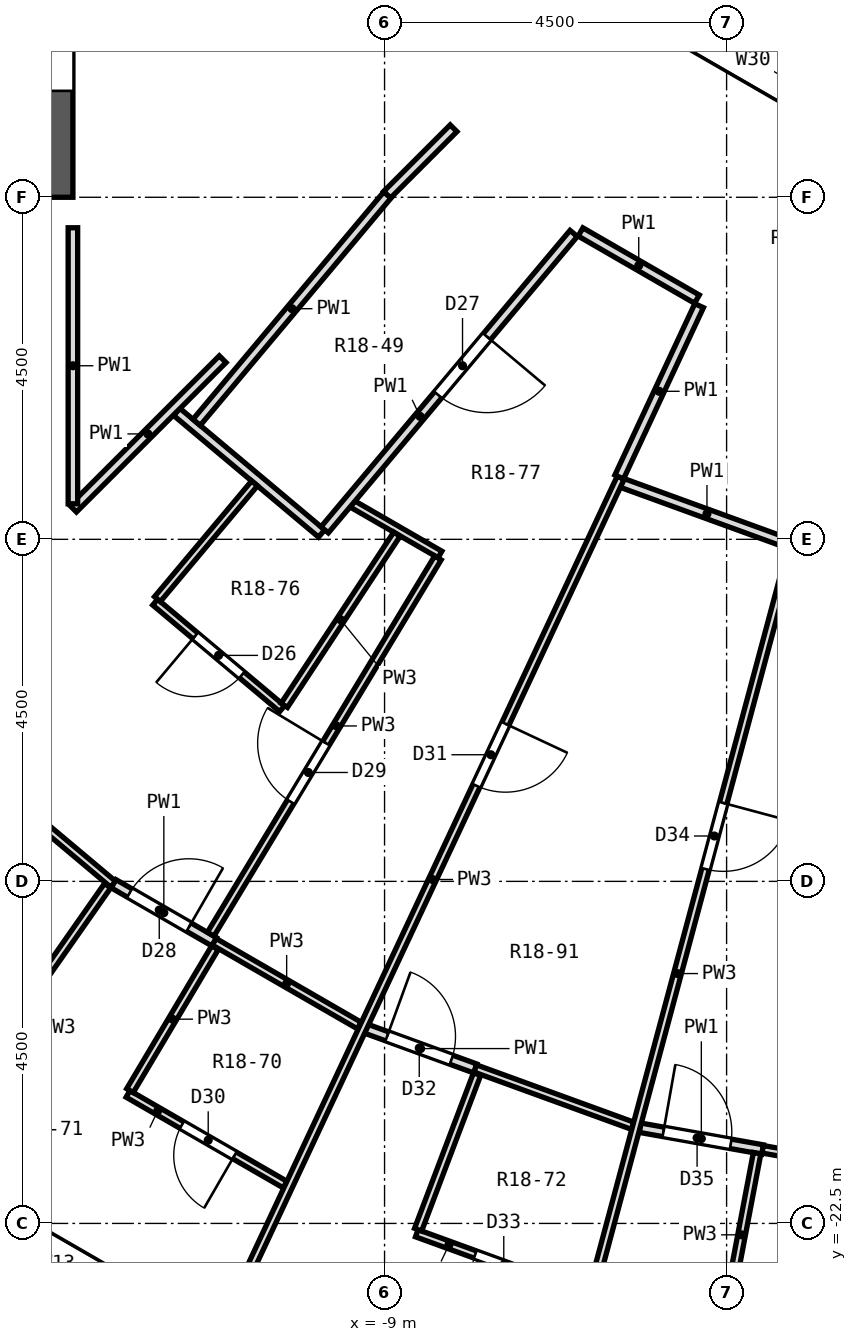
"""IFC4 building model, lengths in metres.
Left out: names, types, materials, properties, quantities, classifications, styles, units other than length and angle.
Written with IfcOpenShell. Run it as: python <this file> out.ifc"""

import sys

from ifc_helpers import new_model, si_unit, direction, frame, frame_2d, origin, place, context, subcontext, project, spatial, rectangle, extrude, element, fill, save


model = new_model("IFC4")
c1 = context("Model", 3, precision=1e-05, world=origin(), true_north=direction((0.0, 1.0)))
c2 = subcontext(c1, "Body", "Model", "MODEL_VIEW")
j1 = project(units=[si_unit("LENGTHUNIT", "METRE"), si_unit("PLANEANGLEUNIT", "RADIAN")], contexts=[c1])
p1 = place(None, origin())
s1 = spatial("IfcSite", under=j1, at=p1, CompositionType="ELEMENT")
p2 = place(p1, origin())
s2 = spatial("IfcBuilding", under=s1, at=p2, CompositionType="ELEMENT")
p3 = place(p2, frame((0.0, 0.0, 101.8)))
s3 = spatial("IfcBuildingStorey", under=s2, at=p3, CompositionType="ELEMENT", Elevation=101.8)
p4 = place(p3, frame((-13.5, -9.0, 0.0), z_axis=(0.0, 0.0, 1.0), x_axis=(0.0, 1.0, 0.0)))
e1 = element("IfcWall", 1, at=p4, inside=s3, PredefinedType="SHEAR", context=c2, shape_type="SweptSolid", body=[
    extrude(rectangle(XDim=18.0, YDim=0.8, at=frame_2d((9.0, 0.0))), origin(), (0.0, 0.0, 1.0), 3.3),
])
p5 = place(p4, frame((15.4, 0.0, 0.0)))
e2 = element("IfcOpeningElement", 2, at=p5, cuts=e1, PredefinedType="OPENING", context=c2, shape_type="SweptSolid", body=[
    extrude(rectangle(XDim=1.2, YDim=2.1, at=frame_2d((0.6, 1.05))), frame((0.0, 0.412, 0.0), z_axis=(0.0, -1.0, 0.0), x_axis=(1.0, 0.0, 0.0)), (0.0, 0.0, 1.0), 0.824),
])
p6 = place(p4, frame((1.4, 0.0, 0.0)))
e3 = element("IfcOpeningElement", 3, at=p6, cuts=e1, PredefinedType="OPENING", context=c2, shape_type="SweptSolid", body=[
    extrude(rectangle(XDim=1.2, YDim=2.1, at=frame_2d((0.6, 1.05))), frame((0.0, 0.412, 0.0), z_axis=(0.0, -1.0, 0.0), x_axis=(1.0, 0.0, 0.0)), (0.0, 0.0, 1.0), 0.824),
])
p7 = place(p4, frame((7.5, 0.0, 0.0)))
e4 = element("IfcOpeningElement", 4, at=p7, cuts=e1, PredefinedType="OPENING", context=c2, shape_type="SweptSolid", body=[
    extrude(rectangle(XDim=3.0, YDim=2.4, at=frame_2d((1.5, 1.2))), frame((0.0, 0.412, 0.0), z_axis=(0.0, -1.0, 0.0), x_axis=(1.0, 0.0, 0.0)), (0.0, 0.0, 1.0), 0.824),
])
p8 = place(p3, frame((-14.878, -22.122, 0.0), z_axis=(0.0, 0.0, 1.0), x_axis=(0.866051847062, -0.499954196102, 0.0)))
e5 = element("IfcWall", 5, at=p8, inside=s3, PredefinedType="SOLIDWALL", context=c2, shape_type="SweptSolid", body=[
    extrude(rectangle(XDim=3.648, YDim=0.6, at=frame_2d((1.824, 0.0))), origin(), (0.0, 0.0, 1.0), 2.8),
])
p9 = place(p8, frame((0.674, 0.0, 0.9)))
e6 = element("IfcOpeningElement", 6, at=p9, cuts=e5, PredefinedType="OPENING", context=c2, shape_type="SweptSolid", body=[
    extrude(rectangle(XDim=2.3, YDim=1.8, at=frame_2d((1.15, 0.9))), frame((0.0, 0.312, 0.0), z_axis=(0.0, -1.0, 0.0), x_axis=(1.0, 0.0, 0.0)), (0.0, 0.0, 1.0), 0.624),
])
p10 = place(p3, frame((-5.773, -6.251, 0.0), z_axis=(0.0, 0.0, 1.0), x_axis=(0.86604563398, -0.499964958637, 0.0)))
e7 = element("IfcWall", 7, at=p10, inside=s3, PredefinedType="SOLIDWALL", context=c2, shape_type="SweptSolid", body=[
    extrude(rectangle(XDim=3.747, YDim=0.6, at=frame_2d((1.874, 0.0))), origin(), (0.0, 0.0, 1.0), 2.8),
])
p11 = place(p10, frame((0.674, 0.0, 0.9)))
e8 = element("IfcOpeningElement", 8, at=p11, cuts=e7, PredefinedType="OPENING", context=c2, shape_type="SweptSolid", body=[
    extrude(rectangle(XDim=2.4, YDim=1.8, at=frame_2d((1.2, 0.9))), frame((0.0, 0.312, 0.0), z_axis=(0.0, -1.0, 0.0), x_axis=(1.0, 0.0, 0.0)), (0.0, 0.0, 1.0), 0.624),
])
p12 = place(p3, frame((-14.335, -16.556, 0.0), z_axis=(0.0, 0.0, 1.0), x_axis=(0.765890459519, -0.642971075568, 0.0)))
e9 = element("IfcWall", 9, at=p12, inside=s3, PredefinedType="PARTITIONING", context=c2, shape_type="SweptSolid", body=[
    extrude(rectangle(XDim=2.306, YDim=0.1, at=frame_2d((1.153, 0.0))), origin(), (0.0, 0.0, 1.0), 2.8),
])
p13 = place(p3, frame((-12.018, -14.327, 0.0), z_axis=(0.0, 0.0, 1.0), x_axis=(0.76605991383, -0.642769171961, 0.0)))
e10 = element("IfcWall", 10, at=p13, inside=s3, PredefinedType="PARTITIONING", context=c2, shape_type="SweptSolid", body=[
    extrude(rectangle(XDim=2.18, YDim=0.1, at=frame_2d((1.09, 0.0))), origin(), (0.0, 0.0, 1.0), 2.8),
])
p14 = place(p13, frame((0.689, 0.0, 0.0)))
e11 = element("IfcOpeningElement", 11, at=p14, cuts=e10, PredefinedType="OPENING", context=c2, shape_type="SweptSolid", body=[
    extrude(rectangle(XDim=0.8, YDim=2.1, at=frame_2d((0.4, 1.05))), frame((0.0, 0.062, 0.0), z_axis=(0.0, -1.0, 0.0), x_axis=(1.0, 0.0, 0.0)), (0.0, 0.0, 1.0), 0.124),
])
p15 = place(p3, frame((-11.735, -11.823, 0.0), z_axis=(0.0, 0.0, 1.0), x_axis=(0.766013925241, -0.642823977724, 0.0)))
e12 = element("IfcWall", 12, at=p15, inside=s3, PredefinedType="PARTITIONING", context=c2, shape_type="SweptSolid", body=[
    extrude(rectangle(XDim=2.489, YDim=0.125, at=frame_2d((1.245, 0.0))), origin(), (0.0, 0.0, 1.0), 2.8),
])
p16 = place(p3, frame((-12.375, -20.796, 0.0), z_axis=(0.0, 0.0, 1.0), x_axis=(0.866037365989, -0.499979280282, 0.0)))
e13 = element("IfcWall", 13, at=p16, inside=s3, PredefinedType="PARTITIONING", context=c2, shape_type="SweptSolid", body=[
    extrude(rectangle(XDim=2.386, YDim=0.1, at=frame_2d((1.193, 0.0))), origin(), (0.0, 0.0, 1.0), 2.8),
])
p17 = place(p16, frame((0.818, 0.0, 0.0)))
e14 = element("IfcOpeningElement", 14, at=p17, cuts=e13, PredefinedType="OPENING", context=c2, shape_type="SweptSolid", body=[
    extrude(rectangle(XDim=0.8, YDim=2.1, at=frame_2d((0.4, 1.05))), frame((0.0, 0.062, 0.0), z_axis=(0.0, -1.0, 0.0), x_axis=(1.0, 0.0, 0.0)), (0.0, 0.0, 1.0), 0.124),
])
p18 = place(p3, frame((-11.242, -18.794, 0.0), z_axis=(0.0, 0.0, 1.0), x_axis=(0.866039875853, -0.499974932805, 0.0)))
e15 = element("IfcWall", 15, at=p18, inside=s3, PredefinedType="PARTITIONING", context=c2, shape_type="SweptSolid", body=[
    extrude(rectangle(XDim=2.204, YDim=0.1, at=frame_2d((1.102, 0.0))), origin(), (0.0, 0.0, 1.0), 2.8),
])
p19 = place(p3, frame((-12.565, -18.031, 0.0), z_axis=(0.0, 0.0, 1.0), x_axis=(0.866198896269, -0.499699381732, 0.0)))
e16 = element("IfcWall", 16, at=p19, inside=s3, PredefinedType="PARTITIONING", context=c2, shape_type="SweptSolid", body=[
    extrude(rectangle(XDim=1.527, YDim=0.125, at=frame_2d((0.763, 0.0))), origin(), (0.0, 0.0, 1.0), 2.8),
])
p20 = place(p19, frame((0.243, 0.0, 0.0)))
e17 = element("IfcOpeningElement", 17, at=p20, cuts=e16, PredefinedType="OPENING", context=c2, shape_type="SweptSolid", body=[
    extrude(rectangle(XDim=0.9, YDim=2.1, at=frame_2d((0.45, 1.05))), frame((0.0, 0.074, 0.0), z_axis=(0.0, -1.0, 0.0), x_axis=(1.0, 0.0, 0.0)), (0.0, 0.0, 1.0), 0.149),
])
p21 = place(p3, frame((-9.422, -13.035, 0.0), z_axis=(0.0, 0.0, 1.0), x_axis=(0.866041828806, -0.499971549949, 0.0)))
e18 = element("IfcWall", 18, at=p21, inside=s3, PredefinedType="PARTITIONING", context=c2, shape_type="SweptSolid", body=[
    extrude(rectangle(XDim=1.329, YDim=0.1, at=frame_2d((0.665, 0.0))), origin(), (0.0, 0.0, 1.0), 2.8),
])
p22 = place(p3, frame((-6.421, -9.456, 0.0), z_axis=(0.0, 0.0, 1.0), x_axis=(0.866118896865, -0.499838030259, 0.0)))
e19 = element("IfcWall", 19, at=p22, inside=s3, PredefinedType="PARTITIONING", context=c2, shape_type="SweptSolid", body=[
    extrude(rectangle(XDim=1.768, YDim=0.125, at=frame_2d((0.884, 0.0))), origin(), (0.0, 0.0, 1.0), 2.8),
])
p23 = place(p3, frame((-8.576, -22.629, 0.0), z_axis=(0.0, 0.0, 1.0), x_axis=(0.939703758344, -0.341989541586, 0.0)))
e20 = element("IfcWall", 20, at=p23, inside=s3, PredefinedType="PARTITIONING", context=c2, shape_type="SweptSolid", body=[
    extrude(rectangle(XDim=2.386, YDim=0.1, at=frame_2d((1.193, 0.0))), origin(), (0.0, 0.0, 1.0), 2.8),
])
p24 = place(p23, frame((0.818, 0.0, 0.0)))
e21 = element("IfcOpeningElement", 21, at=p24, cuts=e20, PredefinedType="OPENING", context=c2, shape_type="SweptSolid", body=[
    extrude(rectangle(XDim=0.8, YDim=2.1, at=frame_2d((0.4, 1.05))), frame((0.0, 0.062, 0.0), z_axis=(0.0, -1.0, 0.0), x_axis=(1.0, 0.0, 0.0)), (0.0, 0.0, 1.0), 0.124),
])
p25 = place(p3, frame((-7.808, -20.461, 0.0), z_axis=(0.0, 0.0, 1.0), x_axis=(0.939728749343, -0.341920864613, 0.0)))
e22 = element("IfcWall", 22, at=p25, inside=s3, PredefinedType="PARTITIONING", context=c2, shape_type="SweptSolid", body=[
    extrude(rectangle(XDim=2.205, YDim=0.1, at=frame_2d((1.103, 0.0))), origin(), (0.0, 0.0, 1.0), 2.8),
])
p26 = place(p3, frame((-9.243, -19.938, 0.0), z_axis=(0.0, 0.0, 1.0), x_axis=(0.939611268692, -0.342243573711, 0.0)))
e23 = element("IfcWall", 23, at=p26, inside=s3, PredefinedType="PARTITIONING", context=c2, shape_type="SweptSolid", body=[
    extrude(rectangle(XDim=1.527, YDim=0.125, at=frame_2d((0.764, 0.0))), origin(), (0.0, 0.0, 1.0), 2.8),
])
p27 = place(p26, frame((0.294, 0.0, 0.0)))
e24 = element("IfcOpeningElement", 24, at=p27, cuts=e23, PredefinedType="OPENING", context=c2, shape_type="SweptSolid", body=[
    extrude(rectangle(XDim=0.9, YDim=2.1, at=frame_2d((0.45, 1.05))), frame((0.0, 0.074, 0.0), z_axis=(0.0, -1.0, 0.0), x_axis=(1.0, 0.0, 0.0)), (0.0, 0.0, 1.0), 0.149),
])
p28 = place(p3, frame((-5.879, -12.756, 0.0), z_axis=(0.0, 0.0, 1.0), x_axis=(0.939637973706, -0.342170247639, 0.0)))
e25 = element("IfcWall", 25, at=p28, inside=s3, PredefinedType="PARTITIONING", context=c2, shape_type="SweptSolid", body=[
    extrude(rectangle(XDim=2.386, YDim=0.125, at=frame_2d((1.193, 0.0))), origin(), (0.0, 0.0, 1.0), 2.8),
])
p29 = place(p3, frame((-5.64, -21.241, 0.0), z_axis=(0.0, 0.0, 1.0), x_axis=(0.984569921273, -0.174991628724, 0.0)))
e26 = element("IfcWall", 26, at=p29, inside=s3, PredefinedType="PARTITIONING", context=c2, shape_type="SweptSolid", body=[
    extrude(rectangle(XDim=1.639, YDim=0.125, at=frame_2d((0.82, 0.0))), origin(), (0.0, 0.0, 1.0), 2.8),
])
p30 = place(p29, frame((0.313, 0.0, 0.0)))
e27 = element("IfcOpeningElement", 27, at=p30, cuts=e26, PredefinedType="OPENING", context=c2, shape_type="SweptSolid", body=[
    extrude(rectangle(XDim=0.9, YDim=2.1, at=frame_2d((0.45, 1.05))), frame((0.0, 0.074, 0.0), z_axis=(0.0, -1.0, 0.0), x_axis=(1.0, 0.0, 0.0)), (0.0, 0.0, 1.0), 0.149),
])
p31 = place(p3, frame((-4.025, -21.525, 0.0), z_axis=(0.0, 0.0, 1.0), x_axis=(0.984791880798, -0.173738169424, 0.0)))
e28 = element("IfcWall", 28, at=p31, inside=s3, PredefinedType="PARTITIONING", context=c2, shape_type="SweptSolid", body=[
    extrude(rectangle(XDim=2.067, YDim=0.1, at=frame_2d((1.034, 0.0))), origin(), (0.0, 0.0, 1.0), 2.8),
])
p32 = place(p3, frame((-13.097, -13.096, 0.0), z_axis=(0.0, 0.0, 1.0), x_axis=(0.707369988597, 0.706843475766, 0.0)))
e29 = element("IfcWall", 29, at=p32, inside=s3, PredefinedType="PARTITIONING", context=c2, shape_type="SweptSolid", body=[
    extrude(rectangle(XDim=2.782, YDim=0.125, at=frame_2d((1.391, 0.0))), origin(), (0.0, 0.0, 1.0), 2.8),
])
p33 = place(p3, frame((-8.968, -8.968, 0.0), z_axis=(0.0, 0.0, 1.0), x_axis=(0.707106781187, 0.707106781187, 0.0)))
e30 = element("IfcWall", 30, at=p33, inside=s3, PredefinedType="PARTITIONING", context=c2, shape_type="SweptSolid", body=[
    extrude(rectangle(XDim=1.238, YDim=0.125, at=frame_2d((0.619, 0.0))), origin(), (0.0, 0.0, 1.0), 2.8),
])
p34 = place(p3, frame((-9.788, -13.375, 0.0), z_axis=(0.0, 0.0, 1.0), x_axis=(0.643234807085, 0.765668977401, 0.0)))
e31 = element("IfcWall", 31, at=p34, inside=s3, PredefinedType="PARTITIONING", context=c2, shape_type="SweptSolid", body=[
    extrude(rectangle(XDim=5.093, YDim=0.125, at=frame_2d((2.546, 0.0))), origin(), (0.0, 0.0, 1.0), 2.8),
])
p35 = place(p34, frame((2.32, 0.0, 0.0)))
e32 = element("IfcOpeningElement", 32, at=p35, cuts=e31, PredefinedType="OPENING", context=c2, shape_type="SweptSolid", body=[
    extrude(rectangle(XDim=1.0, YDim=2.1, at=frame_2d((0.5, 1.05))), frame((0.0, 0.074, 0.0), z_axis=(0.0, -1.0, 0.0), x_axis=(1.0, 0.0, 0.0)), (0.0, 0.0, 1.0), 0.149),
])
p36 = place(p3, frame((-11.988, -14.287, 0.0), z_axis=(0.0, 0.0, 1.0), x_axis=(0.642742530466, 0.766082266816, 0.0)))
e33 = element("IfcWall", 33, at=p36, inside=s3, PredefinedType="PARTITIONING", context=c2, shape_type="SweptSolid", body=[
    extrude(rectangle(XDim=1.987, YDim=0.1, at=frame_2d((0.994, 0.0))), origin(), (0.0, 0.0, 1.0), 2.8),
])
p37 = place(p3, frame((-11.473, -11.961, 0.0), z_axis=(0.0, 0.0, 1.0), x_axis=(0.642813583638, 0.766022647636, 0.0)))
e34 = element("IfcWall", 34, at=p37, inside=s3, PredefinedType="PARTITIONING", context=c2, shape_type="SweptSolid", body=[
    extrude(rectangle(XDim=3.904, YDim=0.125, at=frame_2d((1.952, 0.0))), origin(), (0.0, 0.0, 1.0), 2.8),
])
p38 = place(p3, frame((-14.721, -21.024, 0.0), z_axis=(0.0, 0.0, 1.0), x_axis=(0.573521163573, 0.819190743926, 0.0)))
e35 = element("IfcWall", 35, at=p38, inside=s3, PredefinedType="PARTITIONING", context=c2, shape_type="SweptSolid", body=[
    extrude(rectangle(XDim=3.621, YDim=0.1, at=frame_2d((1.811, 0.0))), origin(), (0.0, 0.0, 1.0), 2.8),
])
p39 = place(p3, frame((-10.319, -15.684, 0.0), z_axis=(0.0, 0.0, 1.0), x_axis=(0.549631473795, 0.835407231842, 0.0)))
e36 = element("IfcWall", 36, at=p39, inside=s3, PredefinedType="PARTITIONING", context=c2, shape_type="SweptSolid", body=[
    extrude(rectangle(XDim=2.695, YDim=0.1, at=frame_2d((1.348, 0.0))), origin(), (0.0, 0.0, 1.0), 2.8),
])
p40 = place(p3, frame((-11.287, -18.695, 0.0), z_axis=(0.0, 0.0, 1.0), x_axis=(0.516964841348, 0.856006631288, 0.0)))
e37 = element("IfcWall", 37, at=p40, inside=s3, PredefinedType="PARTITIONING", context=c2, shape_type="SweptSolid", body=[
    extrude(rectangle(XDim=5.782, YDim=0.1, at=frame_2d((2.891, 0.0))), origin(), (0.0, 0.0, 1.0), 2.8),
])
p41 = place(p40, frame((2.035, 0.0, 0.0)))
e38 = element("IfcOpeningElement", 38, at=p41, cuts=e37, PredefinedType="OPENING", context=c2, shape_type="SweptSolid", body=[
    extrude(rectangle(XDim=0.9, YDim=2.1, at=frame_2d((0.45, 1.05))), frame((0.0, 0.062, 0.0), z_axis=(0.0, -1.0, 0.0), x_axis=(1.0, 0.0, 0.0)), (0.0, 0.0, 1.0), 0.124),
])
p42 = place(p3, frame((-12.349, -20.753, 0.0), z_axis=(0.0, 0.0, 1.0), x_axis=(0.511242513148, 0.859436497218, 0.0)))
e39 = element("IfcWall", 39, at=p42, inside=s3, PredefinedType="PARTITIONING", context=c2, shape_type="SweptSolid", body=[
    extrude(rectangle(XDim=2.188, YDim=0.1, at=frame_2d((1.094, 0.0))), origin(), (0.0, 0.0, 1.0), 2.8),
])
p43 = place(p3, frame((-10.845, -23.261, 0.0), z_axis=(0.0, 0.0, 1.0), x_axis=(0.424206154739, 0.905565645484, 0.0)))
e40 = element("IfcWall", 40, at=p43, inside=s3, PredefinedType="PARTITIONING", context=c2, shape_type="SweptSolid", body=[
    extrude(rectangle(XDim=11.675, YDim=0.1, at=frame_2d((5.837, 0.0))), origin(), (0.0, 0.0, 1.0), 2.8),
])
p44 = place(p43, frame((7.199, 0.0, 0.0)))
e41 = element("IfcOpeningElement", 41, at=p44, cuts=e40, PredefinedType="OPENING", context=c2, shape_type="SweptSolid", body=[
    extrude(rectangle(XDim=0.9, YDim=2.1, at=frame_2d((0.45, 1.05))), frame((0.0, 0.062, 0.0), z_axis=(0.0, -1.0, 0.0), x_axis=(1.0, 0.0, 0.0)), (0.0, 0.0, 1.0), 0.124),
])
p45 = place(p3, frame((-5.913, -12.68, 0.0), z_axis=(0.0, 0.0, 1.0), x_axis=(0.422627539676, 0.906303460606, 0.0)))
e42 = element("IfcWall", 42, at=p45, inside=s3, PredefinedType="PARTITIONING", context=c2, shape_type="SweptSolid", body=[
    extrude(rectangle(XDim=2.488, YDim=0.125, at=frame_2d((1.244, 0.0))), origin(), (0.0, 0.0, 1.0), 2.8),
])
p46 = place(p3, frame((-8.558, -22.582, 0.0), z_axis=(0.0, 0.0, 1.0), x_axis=(0.35430099241, 0.935131438236, 0.0)))
e43 = element("IfcWall", 43, at=p46, inside=s3, PredefinedType="PARTITIONING", context=c2, shape_type="SweptSolid", body=[
    extrude(rectangle(XDim=2.188, YDim=0.1, at=frame_2d((1.094, 0.0))), origin(), (0.0, 0.0, 1.0), 2.8),
])
p47 = place(p3, frame((-6.642, -24.791, 0.0), z_axis=(0.0, 0.0, 1.0), x_axis=(0.259103074619, 0.965849676049, 0.0)))
e44 = element("IfcWall", 44, at=p47, inside=s3, PredefinedType="PARTITIONING", context=c2, shape_type="SweptSolid", body=[
    extrude(rectangle(XDim=11.549, YDim=0.1, at=frame_2d((5.774, 0.0))), origin(), (0.0, 0.0, 1.0), 2.8),
])
p48 = place(p47, frame((7.199, 0.0, 0.0)))
e45 = element("IfcOpeningElement", 45, at=p48, cuts=e44, PredefinedType="OPENING", context=c2, shape_type="SweptSolid", body=[
    extrude(rectangle(XDim=0.9, YDim=2.1, at=frame_2d((0.45, 1.05))), frame((0.0, 0.062, 0.0), z_axis=(0.0, -1.0, 0.0), x_axis=(1.0, 0.0, 0.0)), (0.0, 0.0, 1.0), 0.124),
])
p49 = place(p3, frame((-4.507, -23.725, 0.0), z_axis=(0.0, 0.0, 1.0), x_axis=(0.186471082638, 0.982460449759, 0.0)))
e46 = element("IfcWall", 46, at=p49, inside=s3, PredefinedType="PARTITIONING", context=c2, shape_type="SweptSolid", body=[
    extrude(rectangle(XDim=2.188, YDim=0.1, at=frame_2d((1.094, 0.0))), origin(), (0.0, 0.0, 1.0), 2.8),
])
p50 = place(p3, frame((-13.1, -13.032, 0.0), z_axis=(0.0, 0.0, 1.0), x_axis=(0.0, 1.0, 0.0)))
e47 = element("IfcWall", 47, at=p50, inside=s3, PredefinedType="PARTITIONING", context=c2, shape_type="SweptSolid", body=[
    extrude(rectangle(XDim=3.632, YDim=0.125, at=frame_2d((1.816, 0.0))), origin(), (0.0, 0.0, 1.0), 2.8),
])
p51 = place(p9, origin())
e48 = element("IfcWindow", 48, at=p51, inside=s3, PartitioningType="SINGLE_PANEL", PredefinedType="WINDOW", context=c2, shape_type="SweptSolid", body=[
    extrude(rectangle(XDim=2.3, YDim=1.8, at=frame_2d((1.15, 0.9))), frame((0.0, 0.18, 0.0), z_axis=(0.0, -1.0, 0.0), x_axis=(1.0, 0.0, 0.0)), (0.0, 0.0, 1.0), 0.06),
])
fill(e6, e48)
p52 = place(p11, origin())
e49 = element("IfcWindow", 49, at=p52, inside=s3, PartitioningType="SINGLE_PANEL", PredefinedType="WINDOW", context=c2, shape_type="SweptSolid", body=[
    extrude(rectangle(XDim=2.4, YDim=1.8, at=frame_2d((1.2, 0.9))), frame((0.0, -0.12, 0.0), z_axis=(0.0, -1.0, 0.0), x_axis=(1.0, 0.0, 0.0)), (0.0, 0.0, 1.0), 0.06),
])
fill(e8, e49)
p53 = place(p14, frame((0.8, 0.0, 0.0), z_axis=(0.0, 0.0, 1.0), x_axis=(-1.0, 0.0, 0.0)))
e50 = element("IfcDoor", 50, at=p53, inside=s3, OperationType="SINGLE_SWING_RIGHT", PredefinedType="DOOR", context=c2, shape_type="SweptSolid", body=[
    extrude(rectangle(XDim=0.8, YDim=2.1, at=frame_2d((0.4, 1.05))), frame((0.0, 0.025, 0.0), z_axis=(0.0, -1.0, 0.0), x_axis=(1.0, 0.0, 0.0)), (0.0, 0.0, 1.0), 0.05),
])
fill(e11, e50)
p54 = place(p35, frame((1.0, 0.0, 0.0), z_axis=(0.0, 0.0, 1.0), x_axis=(-1.0, 0.0, 0.0)))
e51 = element("IfcDoor", 51, at=p54, inside=s3, OperationType="SINGLE_SWING_LEFT", PredefinedType="DOOR", context=c2, shape_type="SweptSolid", body=[
    extrude(rectangle(XDim=1.0, YDim=2.1, at=frame_2d((0.5, 1.05))), frame((0.0, 0.025, 0.0), z_axis=(0.0, -1.0, 0.0), x_axis=(1.0, 0.0, 0.0)), (0.0, 0.0, 1.0), 0.05),
])
fill(e32, e51)
p55 = place(p20, origin())
e52 = element("IfcDoor", 52, at=p55, inside=s3, OperationType="SINGLE_SWING_RIGHT", PredefinedType="DOOR", context=c2, shape_type="SweptSolid", body=[
    extrude(rectangle(XDim=0.9, YDim=2.1, at=frame_2d((0.45, 1.05))), frame((0.0, 0.025, 0.0), z_axis=(0.0, -1.0, 0.0), x_axis=(1.0, 0.0, 0.0)), (0.0, 0.0, 1.0), 0.05),
])
fill(e17, e52)
p56 = place(p41, origin())
e53 = element("IfcDoor", 53, at=p56, inside=s3, OperationType="SINGLE_SWING_RIGHT", PredefinedType="DOOR", context=c2, shape_type="SweptSolid", body=[
    extrude(rectangle(XDim=0.9, YDim=2.1, at=frame_2d((0.45, 1.05))), frame((0.0, 0.025, 0.0), z_axis=(0.0, -1.0, 0.0), x_axis=(1.0, 0.0, 0.0)), (0.0, 0.0, 1.0), 0.05),
])
fill(e38, e53)
p57 = place(p17, frame((0.8, 0.0, 0.0), z_axis=(0.0, 0.0, 1.0), x_axis=(-1.0, 0.0, 0.0)))
e54 = element("IfcDoor", 54, at=p57, inside=s3, OperationType="SINGLE_SWING_LEFT", PredefinedType="DOOR", context=c2, shape_type="SweptSolid", body=[
    extrude(rectangle(XDim=0.8, YDim=2.1, at=frame_2d((0.4, 1.05))), frame((0.0, 0.025, 0.0), z_axis=(0.0, -1.0, 0.0), x_axis=(1.0, 0.0, 0.0)), (0.0, 0.0, 1.0), 0.05),
])
fill(e14, e54)
p58 = place(p44, frame((0.9, 0.0, 0.0), z_axis=(0.0, 0.0, 1.0), x_axis=(-1.0, 0.0, 0.0)))
e55 = element("IfcDoor", 55, at=p58, inside=s3, OperationType="SINGLE_SWING_LEFT", PredefinedType="DOOR", context=c2, shape_type="SweptSolid", body=[
    extrude(rectangle(XDim=0.9, YDim=2.1, at=frame_2d((0.45, 1.05))), frame((0.0, 0.025, 0.0), z_axis=(0.0, -1.0, 0.0), x_axis=(1.0, 0.0, 0.0)), (0.0, 0.0, 1.0), 0.05),
])
fill(e41, e55)
p59 = place(p27, origin())
e56 = element("IfcDoor", 56, at=p59, inside=s3, OperationType="SINGLE_SWING_LEFT", PredefinedType="DOOR", context=c2, shape_type="SweptSolid", body=[
    extrude(rectangle(XDim=0.9, YDim=2.1, at=frame_2d((0.45, 1.05))), frame((0.0, 0.025, 0.0), z_axis=(0.0, -1.0, 0.0), x_axis=(1.0, 0.0, 0.0)), (0.0, 0.0, 1.0), 0.05),
])
fill(e24, e56)
p60 = place(p24, frame((0.8, 0.0, 0.0), z_axis=(0.0, 0.0, 1.0), x_axis=(-1.0, 0.0, 0.0)))
e57 = element("IfcDoor", 57, at=p60, inside=s3, OperationType="SINGLE_SWING_LEFT", PredefinedType="DOOR", context=c2, shape_type="SweptSolid", body=[
    extrude(rectangle(XDim=0.8, YDim=2.1, at=frame_2d((0.4, 1.05))), frame((0.0, 0.025, 0.0), z_axis=(0.0, -1.0, 0.0), x_axis=(1.0, 0.0, 0.0)), (0.0, 0.0, 1.0), 0.05),
])
fill(e21, e57)
p61 = place(p48, frame((0.9, 0.0, 0.0), z_axis=(0.0, 0.0, 1.0), x_axis=(-1.0, 0.0, 0.0)))
e58 = element("IfcDoor", 58, at=p61, inside=s3, OperationType="SINGLE_SWING_LEFT", PredefinedType="DOOR", context=c2, shape_type="SweptSolid", body=[
    extrude(rectangle(XDim=0.9, YDim=2.1, at=frame_2d((0.45, 1.05))), frame((0.0, 0.025, 0.0), z_axis=(0.0, -1.0, 0.0), x_axis=(1.0, 0.0, 0.0)), (0.0, 0.0, 1.0), 0.05),
])
fill(e45, e58)
p62 = place(p30, origin())
e59 = element("IfcDoor", 59, at=p62, inside=s3, OperationType="SINGLE_SWING_LEFT", PredefinedType="DOOR", context=c2, shape_type="SweptSolid", body=[
    extrude(rectangle(XDim=0.9, YDim=2.1, at=frame_2d((0.45, 1.05))), frame((0.0, 0.025, 0.0), z_axis=(0.0, -1.0, 0.0), x_axis=(1.0, 0.0, 0.0)), (0.0, 0.0, 1.0), 0.05),
])
fill(e27, e59)
save(model, sys.argv[1])
